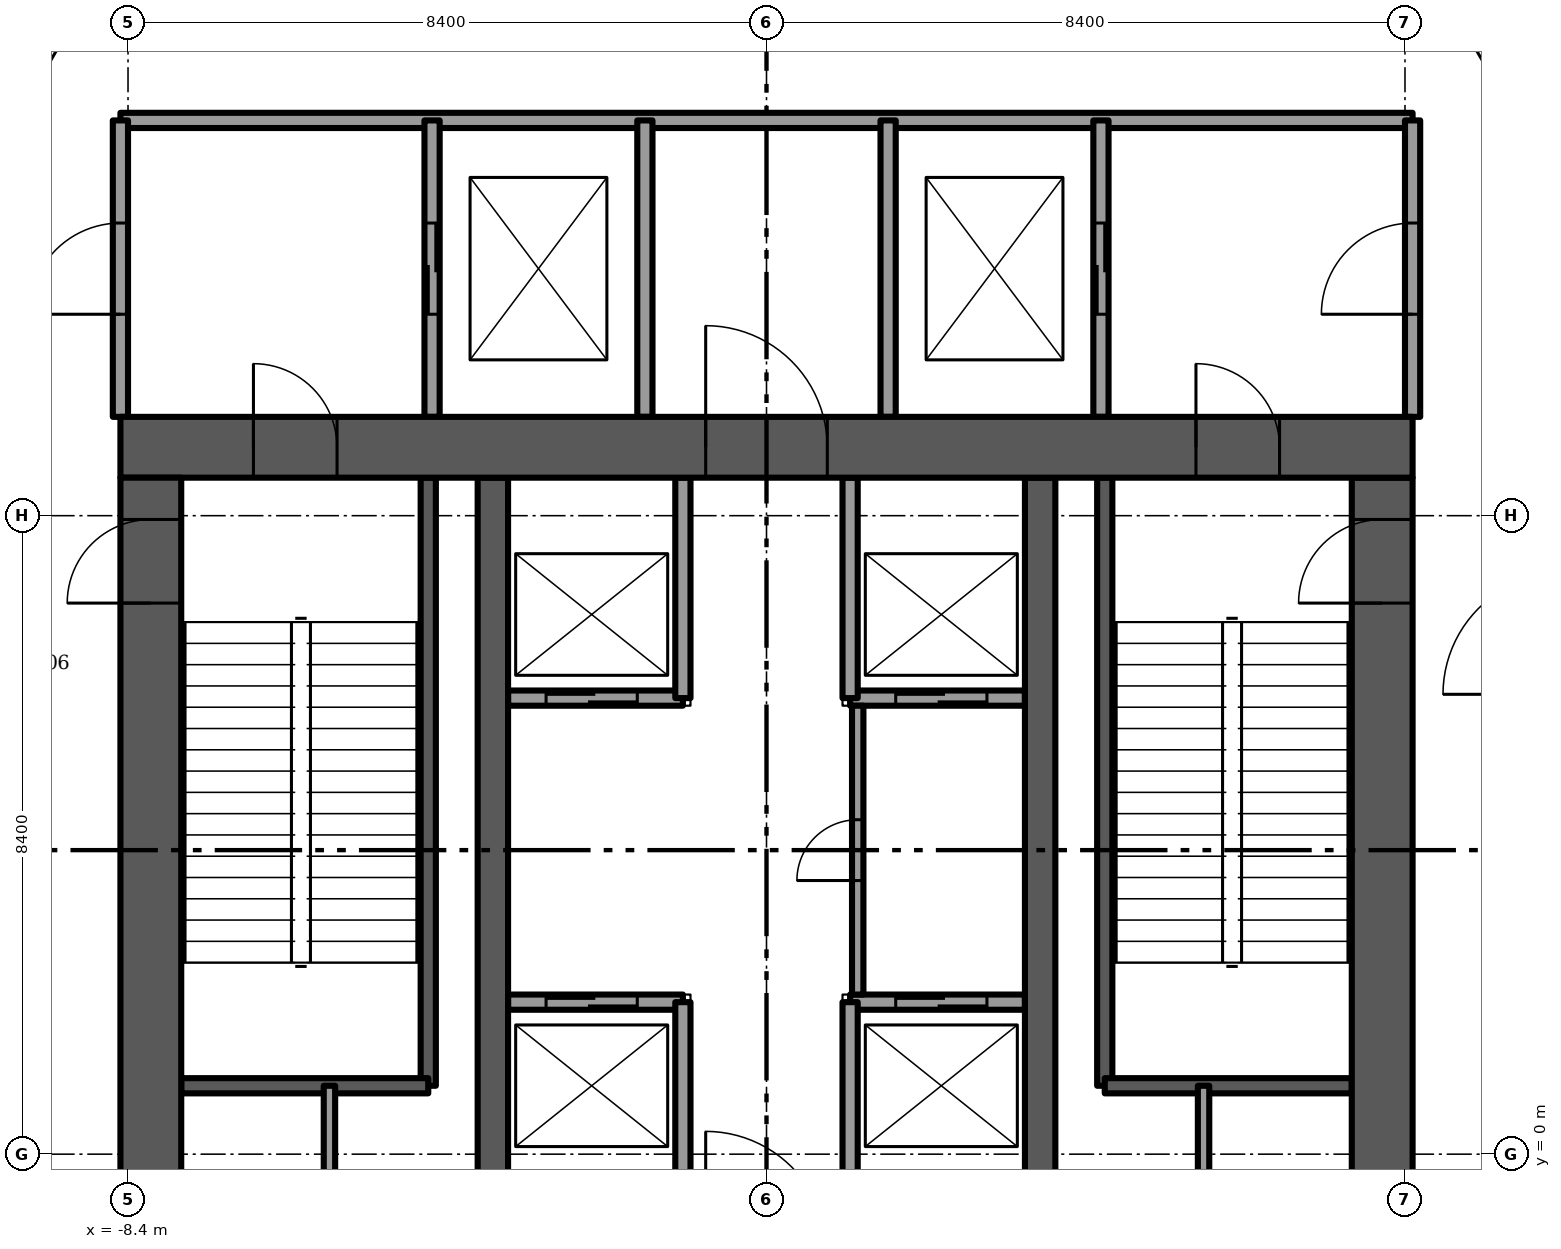
"""IFC4 building model, lengths in metres.
Left out: names, types, materials, properties, quantities, classifications, styles, units other than length and angle.
Written with IfcOpenShell. Run it as: python <this file> out.ifc"""

import sys

from ifc_helpers import new_model, si_unit, direction, frame, frame_2d, origin, place, context, subcontext, project, spatial, rectangle, extrude, element, fill, save


model = new_model("IFC4")
c1 = context("Model", 3, precision=1e-05, world=origin(), true_north=direction((0.0, 1.0)))
c2 = subcontext(c1, "Body", "Model", "MODEL_VIEW")
j1 = project(units=[si_unit("LENGTHUNIT", "METRE"), si_unit("PLANEANGLEUNIT", "RADIAN")], contexts=[c1])
p1 = place(None, origin())
s1 = spatial("IfcSite", under=j1, at=p1, CompositionType="ELEMENT")
p2 = place(p1, origin())
s2 = spatial("IfcBuilding", under=s1, at=p2, CompositionType="ELEMENT")
p3 = place(p2, frame((0.0, 0.0, 151.0)))
s3 = spatial("IfcBuildingStorey", under=s2, at=p3, CompositionType="ELEMENT", Elevation=151.0)
p4 = place(p3, frame((-8.5, 9.3, -0.3), z_axis=(0.0, 0.0, 1.0), x_axis=(1.0, 0.0, 0.0)))
e1 = element("IfcWall", 1, at=p4, inside=s3, PredefinedType="SHEAR", context=c2, shape_type="SweptSolid", body=[
    extrude(rectangle(XDim=17.0, YDim=0.8, at=frame_2d((8.5, 0.0))), origin(), (0.0, 0.0, 1.0), 6.0),
])
p5 = place(p4, frame((7.7, 0.0, 0.0)))
e2 = element("IfcOpeningElement", 2, at=p5, cuts=e1, PredefinedType="OPENING", context=c2, shape_type="SweptSolid", body=[
    extrude(rectangle(XDim=1.6, YDim=2.1, at=frame_2d((0.8, 1.05))), frame((0.0, 0.4, 0.0), z_axis=(0.0, -1.0, 0.0), x_axis=(1.0, 0.0, 0.0)), (0.0, 0.0, 1.0), 0.8),
])
p6 = place(p4, frame((1.75, 0.0, 0.0)))
e3 = element("IfcOpeningElement", 3, at=p6, cuts=e1, PredefinedType="OPENING", context=c2, shape_type="SweptSolid", body=[
    extrude(rectangle(XDim=1.1, YDim=2.1, at=frame_2d((0.55, 1.05))), frame((0.0, 0.4, 0.0), z_axis=(0.0, -1.0, 0.0), x_axis=(1.0, 0.0, 0.0)), (0.0, 0.0, 1.0), 0.8),
])
p7 = place(p4, frame((14.15, 0.0, 0.0)))
e4 = element("IfcOpeningElement", 4, at=p7, cuts=e1, PredefinedType="OPENING", context=c2, shape_type="SweptSolid", body=[
    extrude(rectangle(XDim=1.1, YDim=2.1, at=frame_2d((0.55, 1.05))), frame((0.0, 0.4, 0.0), z_axis=(0.0, -1.0, 0.0), x_axis=(1.0, 0.0, 0.0)), (0.0, 0.0, 1.0), 0.8),
])
p8 = place(p3, frame((-8.1, -0.9, -0.3), z_axis=(0.0, 0.0, 1.0), x_axis=(0.0, 1.0, 0.0)))
e5 = element("IfcWall", 5, at=p8, inside=s3, PredefinedType="SHEAR", context=c2, shape_type="SweptSolid", body=[
    extrude(rectangle(XDim=9.8, YDim=0.8, at=frame_2d((4.9, 0.0))), origin(), (0.0, 0.0, 1.0), 6.0),
])
p9 = place(p8, frame((8.15, 0.0, 0.0)))
e6 = element("IfcOpeningElement", 6, at=p9, cuts=e5, PredefinedType="OPENING", context=c2, shape_type="SweptSolid", body=[
    extrude(rectangle(XDim=1.1, YDim=2.1, at=frame_2d((0.55, 1.05))), frame((0.0, 0.4, 0.0), z_axis=(0.0, -1.0, 0.0), x_axis=(1.0, 0.0, 0.0)), (0.0, 0.0, 1.0), 0.8),
])
p10 = place(p3, frame((8.1, -0.9, -0.3), z_axis=(0.0, 0.0, 1.0), x_axis=(0.0, 1.0, 0.0)))
e7 = element("IfcWall", 7, at=p10, inside=s3, PredefinedType="SHEAR", context=c2, shape_type="SweptSolid", body=[
    extrude(rectangle(XDim=9.8, YDim=0.8, at=frame_2d((4.9, 0.0))), origin(), (0.0, 0.0, 1.0), 6.0),
])
p11 = place(p10, frame((8.15, 0.0, 0.0)))
e8 = element("IfcOpeningElement", 8, at=p11, cuts=e7, PredefinedType="OPENING", context=c2, shape_type="SweptSolid", body=[
    extrude(rectangle(XDim=1.1, YDim=2.1, at=frame_2d((0.55, 1.05))), frame((0.0, 0.4, 0.0), z_axis=(0.0, -1.0, 0.0), x_axis=(1.0, 0.0, 0.0)), (0.0, 0.0, 1.0), 0.8),
])
for number, where, z_axis, x_axis in (
    (9, (-3.6, -0.9, -0.3), (0.0, 0.0, 1.0), (0.0, 1.0, 0.0)),
    (10, (3.6, -0.9, -0.3), (0.0, 0.0, 1.0), (0.0, 1.0, 0.0)),
):
    element("IfcWall", number, at=place(p3, frame(where, z_axis=z_axis, x_axis=x_axis)), inside=s3, PredefinedType="SHEAR", context=c2, shape_type="SweptSolid", body=[
        extrude(rectangle(XDim=9.8, YDim=0.4, at=frame_2d((4.9, 0.0))), origin(), (0.0, 0.0, 1.0), 6.0),
    ])
p12 = place(p3, frame((-3.4, 2.0, 0.0), z_axis=(0.0, 0.0, 1.0), x_axis=(1.0, 0.0, 0.0)))
e11 = element("IfcWall", 11, at=p12, inside=s3, PredefinedType="PARTITIONING", context=c2, shape_type="SweptSolid", body=[
    extrude(rectangle(XDim=2.3, YDim=0.2, at=frame_2d((1.15, 0.0))), origin(), (0.0, 0.0, 1.0), 5.7),
])
p13 = place(p12, frame((0.5, 0.0, 0.0)))
e12 = element("IfcOpeningElement", 12, at=p13, cuts=e11, PredefinedType="OPENING", context=c2, shape_type="SweptSolid", body=[
    extrude(rectangle(XDim=1.2, YDim=2.1, at=frame_2d((0.6, 1.05))), frame((0.0, 0.1, 0.0), z_axis=(0.0, -1.0, 0.0), x_axis=(1.0, 0.0, 0.0)), (0.0, 0.0, 1.0), 0.2),
])
p14 = place(p3, frame((-3.4, 6.0, 0.0), z_axis=(0.0, 0.0, 1.0), x_axis=(1.0, 0.0, 0.0)))
e13 = element("IfcWall", 13, at=p14, inside=s3, PredefinedType="PARTITIONING", context=c2, shape_type="SweptSolid", body=[
    extrude(rectangle(XDim=2.3, YDim=0.2, at=frame_2d((1.15, 0.0))), origin(), (0.0, 0.0, 1.0), 5.7),
])
p15 = place(p14, frame((0.5, 0.0, 0.0)))
e14 = element("IfcOpeningElement", 14, at=p15, cuts=e13, PredefinedType="OPENING", context=c2, shape_type="SweptSolid", body=[
    extrude(rectangle(XDim=1.2, YDim=2.1, at=frame_2d((0.6, 1.05))), frame((0.0, 0.1, 0.0), z_axis=(0.0, -1.0, 0.0), x_axis=(1.0, 0.0, 0.0)), (0.0, 0.0, 1.0), 0.2),
])
p16 = place(p3, frame((1.1, 2.0, 0.0), z_axis=(0.0, 0.0, 1.0), x_axis=(1.0, 0.0, 0.0)))
e15 = element("IfcWall", 15, at=p16, inside=s3, PredefinedType="PARTITIONING", context=c2, shape_type="SweptSolid", body=[
    extrude(rectangle(XDim=2.3, YDim=0.2, at=frame_2d((1.15, 0.0))), origin(), (0.0, 0.0, 1.0), 5.7),
])
p17 = place(p16, frame((0.6, 0.0, 0.0)))
e16 = element("IfcOpeningElement", 16, at=p17, cuts=e15, PredefinedType="OPENING", context=c2, shape_type="SweptSolid", body=[
    extrude(rectangle(XDim=1.2, YDim=2.1, at=frame_2d((0.6, 1.05))), frame((0.0, 0.1, 0.0), z_axis=(0.0, -1.0, 0.0), x_axis=(1.0, 0.0, 0.0)), (0.0, 0.0, 1.0), 0.2),
])
p18 = place(p3, frame((1.1, 6.0, 0.0), z_axis=(0.0, 0.0, 1.0), x_axis=(1.0, 0.0, 0.0)))
e17 = element("IfcWall", 17, at=p18, inside=s3, PredefinedType="PARTITIONING", context=c2, shape_type="SweptSolid", body=[
    extrude(rectangle(XDim=2.3, YDim=0.2, at=frame_2d((1.15, 0.0))), origin(), (0.0, 0.0, 1.0), 5.7),
])
p19 = place(p18, frame((0.6, 0.0, 0.0)))
e18 = element("IfcOpeningElement", 18, at=p19, cuts=e17, PredefinedType="OPENING", context=c2, shape_type="SweptSolid", body=[
    extrude(rectangle(XDim=1.2, YDim=2.1, at=frame_2d((0.6, 1.05))), frame((0.0, 0.1, 0.0), z_axis=(0.0, -1.0, 0.0), x_axis=(1.0, 0.0, 0.0)), (0.0, 0.0, 1.0), 0.2),
])
for number, where, z_axis, x_axis in (
    (19, (-1.1, -0.9, 0.0), (0.0, 0.0, 1.0), (0.0, 1.0, 0.0)),
    (20, (1.1, -0.9, 0.0), (0.0, 0.0, 1.0), (0.0, 1.0, 0.0)),
    (21, (-1.1, 6.0, 0.0), (0.0, 0.0, 1.0), (0.0, 1.0, 0.0)),
    (22, (1.1, 6.0, 0.0), (0.0, 0.0, 1.0), (0.0, 1.0, 0.0)),
):
    element("IfcWall", number, at=place(p3, frame(where, z_axis=z_axis, x_axis=x_axis)), inside=s3, PredefinedType="PARTITIONING", context=c2, shape_type="SweptSolid", body=[
        extrude(rectangle(XDim=2.9, YDim=0.2, at=frame_2d((1.45, 0.0))), origin(), (0.0, 0.0, 1.0), 5.7),
    ])
p20 = place(p3, frame((-4.45, 0.9, -0.3), z_axis=(0.0, 0.0, 1.0), x_axis=(0.0, 1.0, 0.0)))
e23 = element("IfcWall", 23, at=p20, inside=s3, PredefinedType="SOLIDWALL", context=c2, shape_type="SweptSolid", body=[
    extrude(rectangle(XDim=8.0, YDim=0.2, at=frame_2d((4.0, 0.0))), origin(), (0.0, 0.0, 1.0), 6.0),
])
p21 = place(p3, frame((-7.7, 0.9, -0.3), z_axis=(0.0, 0.0, 1.0), x_axis=(1.0, 0.0, 0.0)))
e24 = element("IfcWall", 24, at=p21, inside=s3, PredefinedType="SOLIDWALL", context=c2, shape_type="SweptSolid", body=[
    extrude(rectangle(XDim=3.25, YDim=0.2, at=frame_2d((1.625, 0.0))), origin(), (0.0, 0.0, 1.0), 6.0),
])
p22 = place(p3, frame((-5.75, -0.9, 0.0), z_axis=(0.0, 0.0, 1.0), x_axis=(0.0, 1.0, 0.0)))
e25 = element("IfcWall", 25, at=p22, inside=s3, PredefinedType="PARTITIONING", context=c2, shape_type="SweptSolid", body=[
    extrude(rectangle(XDim=1.8, YDim=0.15, at=frame_2d((0.9, 0.0))), origin(), (0.0, 0.0, 1.0), 5.7),
])
p23 = place(p3, frame((4.45, 0.9, -0.3), z_axis=(0.0, 0.0, 1.0), x_axis=(0.0, 1.0, 0.0)))
e26 = element("IfcWall", 26, at=p23, inside=s3, PredefinedType="SOLIDWALL", context=c2, shape_type="SweptSolid", body=[
    extrude(rectangle(XDim=8.0, YDim=0.2, at=frame_2d((4.0, 0.0))), origin(), (0.0, 0.0, 1.0), 6.0),
])
p24 = place(p3, frame((4.45, 0.9, -0.3), z_axis=(0.0, 0.0, 1.0), x_axis=(1.0, 0.0, 0.0)))
e27 = element("IfcWall", 27, at=p24, inside=s3, PredefinedType="SOLIDWALL", context=c2, shape_type="SweptSolid", body=[
    extrude(rectangle(XDim=3.25, YDim=0.2, at=frame_2d((1.625, 0.0))), origin(), (0.0, 0.0, 1.0), 6.0),
])
p25 = place(p3, frame((5.75, -0.9, 0.0), z_axis=(0.0, 0.0, 1.0), x_axis=(0.0, 1.0, 0.0)))
e28 = element("IfcWall", 28, at=p25, inside=s3, PredefinedType="PARTITIONING", context=c2, shape_type="SweptSolid", body=[
    extrude(rectangle(XDim=1.8, YDim=0.15, at=frame_2d((0.9, 0.0))), origin(), (0.0, 0.0, 1.0), 5.7),
])
p26 = place(p3, frame((-8.5, 13.6, 0.0), z_axis=(0.0, 0.0, 1.0), x_axis=(1.0, 0.0, 0.0)))
e29 = element("IfcWall", 29, at=p26, inside=s3, PredefinedType="PARTITIONING", context=c2, shape_type="SweptSolid", body=[
    extrude(rectangle(XDim=17.0, YDim=0.2, at=frame_2d((8.5, 0.0))), origin(), (0.0, 0.0, 1.0), 5.7),
])
p27 = place(p3, frame((-8.5, 9.7, 0.0), z_axis=(0.0, 0.0, 1.0), x_axis=(0.0, 1.0, 0.0)))
e30 = element("IfcWall", 30, at=p27, inside=s3, PredefinedType="PARTITIONING", context=c2, shape_type="SweptSolid", body=[
    extrude(rectangle(XDim=3.9, YDim=0.2, at=frame_2d((1.95, 0.0))), origin(), (0.0, 0.0, 1.0), 5.7),
])
p28 = place(p27, frame((1.35, 0.0, 0.0)))
e31 = element("IfcOpeningElement", 31, at=p28, cuts=e30, PredefinedType="OPENING", context=c2, shape_type="SweptSolid", body=[
    extrude(rectangle(XDim=1.2, YDim=2.1, at=frame_2d((0.6, 1.05))), frame((0.0, 0.1, 0.0), z_axis=(0.0, -1.0, 0.0), x_axis=(1.0, 0.0, 0.0)), (0.0, 0.0, 1.0), 0.2),
])
p29 = place(p3, frame((8.5, 9.7, 0.0), z_axis=(0.0, 0.0, 1.0), x_axis=(0.0, 1.0, 0.0)))
e32 = element("IfcWall", 32, at=p29, inside=s3, PredefinedType="PARTITIONING", context=c2, shape_type="SweptSolid", body=[
    extrude(rectangle(XDim=3.9, YDim=0.2, at=frame_2d((1.95, 0.0))), origin(), (0.0, 0.0, 1.0), 5.7),
])
p30 = place(p29, frame((1.35, 0.0, 0.0)))
e33 = element("IfcOpeningElement", 33, at=p30, cuts=e32, PredefinedType="OPENING", context=c2, shape_type="SweptSolid", body=[
    extrude(rectangle(XDim=1.2, YDim=2.1, at=frame_2d((0.6, 1.05))), frame((0.0, 0.1, 0.0), z_axis=(0.0, -1.0, 0.0), x_axis=(1.0, 0.0, 0.0)), (0.0, 0.0, 1.0), 0.2),
])
p31 = place(p3, frame((-4.4, 9.7, 0.0), z_axis=(0.0, 0.0, 1.0), x_axis=(0.0, 1.0, 0.0)))
e34 = element("IfcWall", 34, at=p31, inside=s3, PredefinedType="PARTITIONING", context=c2, shape_type="SweptSolid", body=[
    extrude(rectangle(XDim=3.9, YDim=0.2, at=frame_2d((1.95, 0.0))), origin(), (0.0, 0.0, 1.0), 5.7),
])
p32 = place(p31, frame((1.35, 0.0, 0.0)))
e35 = element("IfcOpeningElement", 35, at=p32, cuts=e34, PredefinedType="OPENING", context=c2, shape_type="SweptSolid", body=[
    extrude(rectangle(XDim=1.2, YDim=2.1, at=frame_2d((0.6, 1.05))), frame((0.0, 0.1, 0.0), z_axis=(0.0, -1.0, 0.0), x_axis=(1.0, 0.0, 0.0)), (0.0, 0.0, 1.0), 0.2),
])
p33 = place(p3, frame((4.4, 9.7, 0.0), z_axis=(0.0, 0.0, 1.0), x_axis=(0.0, 1.0, 0.0)))
e36 = element("IfcWall", 36, at=p33, inside=s3, PredefinedType="PARTITIONING", context=c2, shape_type="SweptSolid", body=[
    extrude(rectangle(XDim=3.9, YDim=0.2, at=frame_2d((1.95, 0.0))), origin(), (0.0, 0.0, 1.0), 5.7),
])
p34 = place(p33, frame((1.35, 0.0, 0.0)))
e37 = element("IfcOpeningElement", 37, at=p34, cuts=e36, PredefinedType="OPENING", context=c2, shape_type="SweptSolid", body=[
    extrude(rectangle(XDim=1.2, YDim=2.1, at=frame_2d((0.6, 1.05))), frame((0.0, 0.1, 0.0), z_axis=(0.0, -1.0, 0.0), x_axis=(1.0, 0.0, 0.0)), (0.0, 0.0, 1.0), 0.2),
])
for number, where, z_axis, x_axis in (
    (38, (-1.6, 9.7, 0.0), (0.0, 0.0, 1.0), (0.0, 1.0, 0.0)),
    (39, (1.6, 9.7, 0.0), (0.0, 0.0, 1.0), (0.0, 1.0, 0.0)),
):
    element("IfcWall", number, at=place(p3, frame(where, z_axis=z_axis, x_axis=x_axis)), inside=s3, PredefinedType="PARTITIONING", context=c2, shape_type="SweptSolid", body=[
        extrude(rectangle(XDim=3.9, YDim=0.2, at=frame_2d((1.95, 0.0))), origin(), (0.0, 0.0, 1.0), 5.7),
    ])
p35 = place(p3, frame((1.2, 2.1, 0.0), z_axis=(0.0, 0.0, 1.0), x_axis=(0.0, 1.0, 0.0)))
e40 = element("IfcWall", 40, at=p35, inside=s3, PredefinedType="PARTITIONING", context=c2, shape_type="SweptSolid", body=[
    extrude(rectangle(XDim=3.8, YDim=0.15, at=frame_2d((1.9, 0.0))), origin(), (0.0, 0.0, 1.0), 5.7),
])
p36 = place(p35, frame((1.5, 0.0, 0.0)))
e41 = element("IfcOpeningElement", 41, at=p36, cuts=e40, PredefinedType="OPENING", context=c2, shape_type="SweptSolid", body=[
    extrude(rectangle(XDim=0.8, YDim=2.1, at=frame_2d((0.4, 1.05))), frame((0.0, 0.075, 0.0), z_axis=(0.0, -1.0, 0.0), x_axis=(1.0, 0.0, 0.0)), (0.0, 0.0, 1.0), 0.15),
])
p37 = place(p13, origin())
e42 = element("IfcDoor", 42, at=p37, inside=s3, OperationType="SLIDING_TO_LEFT", PredefinedType="DOOR", context=c2, shape_type="SweptSolid", body=[
    extrude(rectangle(XDim=1.2, YDim=2.1, at=frame_2d((0.6, 1.05))), frame((0.0, 0.025, 0.0), z_axis=(0.0, -1.0, 0.0), x_axis=(1.0, 0.0, 0.0)), (0.0, 0.0, 1.0), 0.05),
])
fill(e12, e42)
p38 = place(p17, origin())
e43 = element("IfcDoor", 43, at=p38, inside=s3, OperationType="SLIDING_TO_LEFT", PredefinedType="DOOR", context=c2, shape_type="SweptSolid", body=[
    extrude(rectangle(XDim=1.2, YDim=2.1, at=frame_2d((0.6, 1.05))), frame((0.0, 0.025, 0.0), z_axis=(0.0, -1.0, 0.0), x_axis=(1.0, 0.0, 0.0)), (0.0, 0.0, 1.0), 0.05),
])
fill(e16, e43)
p39 = place(p15, origin())
e44 = element("IfcDoor", 44, at=p39, inside=s3, OperationType="SLIDING_TO_LEFT", PredefinedType="DOOR", context=c2, shape_type="SweptSolid", body=[
    extrude(rectangle(XDim=1.2, YDim=2.1, at=frame_2d((0.6, 1.05))), frame((0.0, 0.025, 0.0), z_axis=(0.0, -1.0, 0.0), x_axis=(1.0, 0.0, 0.0)), (0.0, 0.0, 1.0), 0.05),
])
fill(e14, e44)
p40 = place(p19, origin())
e45 = element("IfcDoor", 45, at=p40, inside=s3, OperationType="SLIDING_TO_LEFT", PredefinedType="DOOR", context=c2, shape_type="SweptSolid", body=[
    extrude(rectangle(XDim=1.2, YDim=2.1, at=frame_2d((0.6, 1.05))), frame((0.0, 0.025, 0.0), z_axis=(0.0, -1.0, 0.0), x_axis=(1.0, 0.0, 0.0)), (0.0, 0.0, 1.0), 0.05),
])
fill(e18, e45)
p41 = place(p5, origin())
e46 = element("IfcDoor", 46, at=p41, inside=s3, OperationType="DOUBLE_DOOR_SINGLE_SWING", PredefinedType="DOOR", context=c2, shape_type="SweptSolid", body=[
    extrude(rectangle(XDim=1.6, YDim=2.1, at=frame_2d((0.8, 1.05))), frame((0.0, 0.025, 0.0), z_axis=(0.0, -1.0, 0.0), x_axis=(1.0, 0.0, 0.0)), (0.0, 0.0, 1.0), 0.05),
])
fill(e2, e46)
p42 = place(p6, origin())
e47 = element("IfcDoor", 47, at=p42, inside=s3, OperationType="SINGLE_SWING_LEFT", PredefinedType="DOOR", context=c2, shape_type="SweptSolid", body=[
    extrude(rectangle(XDim=1.1, YDim=2.1, at=frame_2d((0.55, 1.05))), frame((0.0, 0.025, 0.0), z_axis=(0.0, -1.0, 0.0), x_axis=(1.0, 0.0, 0.0)), (0.0, 0.0, 1.0), 0.05),
])
fill(e3, e47)
p43 = place(p9, origin())
e48 = element("IfcDoor", 48, at=p43, inside=s3, OperationType="SINGLE_SWING_RIGHT", PredefinedType="DOOR", context=c2, shape_type="SweptSolid", body=[
    extrude(rectangle(XDim=1.1, YDim=2.1, at=frame_2d((0.55, 1.05))), frame((0.0, 0.025, 0.0), z_axis=(0.0, -1.0, 0.0), x_axis=(1.0, 0.0, 0.0)), (0.0, 0.0, 1.0), 0.05),
])
fill(e6, e48)
p44 = place(p7, origin())
e49 = element("IfcDoor", 49, at=p44, inside=s3, OperationType="SINGLE_SWING_RIGHT", PredefinedType="DOOR", context=c2, shape_type="SweptSolid", body=[
    extrude(rectangle(XDim=1.1, YDim=2.1, at=frame_2d((0.55, 1.05))), frame((0.0, 0.025, 0.0), z_axis=(0.0, -1.0, 0.0), x_axis=(1.0, 0.0, 0.0)), (0.0, 0.0, 1.0), 0.05),
])
fill(e4, e49)
p45 = place(p11, origin())
e50 = element("IfcDoor", 50, at=p45, inside=s3, OperationType="SINGLE_SWING_LEFT", PredefinedType="DOOR", context=c2, shape_type="SweptSolid", body=[
    extrude(rectangle(XDim=1.1, YDim=2.1, at=frame_2d((0.55, 1.05))), frame((0.0, 0.025, 0.0), z_axis=(0.0, -1.0, 0.0), x_axis=(1.0, 0.0, 0.0)), (0.0, 0.0, 1.0), 0.05),
])
fill(e8, e50)
p46 = place(p32, origin())
e51 = element("IfcDoor", 51, at=p46, inside=s3, OperationType="SLIDING_TO_LEFT", PredefinedType="DOOR", context=c2, shape_type="SweptSolid", body=[
    extrude(rectangle(XDim=1.2, YDim=2.1, at=frame_2d((0.6, 1.05))), frame((0.0, 0.025, 0.0), z_axis=(0.0, -1.0, 0.0), x_axis=(1.0, 0.0, 0.0)), (0.0, 0.0, 1.0), 0.05),
])
fill(e35, e51)
p47 = place(p28, origin())
e52 = element("IfcDoor", 52, at=p47, inside=s3, OperationType="SINGLE_SWING_LEFT", PredefinedType="DOOR", context=c2, shape_type="SweptSolid", body=[
    extrude(rectangle(XDim=1.2, YDim=2.1, at=frame_2d((0.6, 1.05))), frame((0.0, 0.025, 0.0), z_axis=(0.0, -1.0, 0.0), x_axis=(1.0, 0.0, 0.0)), (0.0, 0.0, 1.0), 0.05),
])
fill(e31, e52)
p48 = place(p34, origin())
e53 = element("IfcDoor", 53, at=p48, inside=s3, OperationType="SLIDING_TO_LEFT", PredefinedType="DOOR", context=c2, shape_type="SweptSolid", body=[
    extrude(rectangle(XDim=1.2, YDim=2.1, at=frame_2d((0.6, 1.05))), frame((0.0, 0.025, 0.0), z_axis=(0.0, -1.0, 0.0), x_axis=(1.0, 0.0, 0.0)), (0.0, 0.0, 1.0), 0.05),
])
fill(e37, e53)
p49 = place(p30, origin())
e54 = element("IfcDoor", 54, at=p49, inside=s3, OperationType="SINGLE_SWING_LEFT", PredefinedType="DOOR", context=c2, shape_type="SweptSolid", body=[
    extrude(rectangle(XDim=1.2, YDim=2.1, at=frame_2d((0.6, 1.05))), frame((0.0, 0.025, 0.0), z_axis=(0.0, -1.0, 0.0), x_axis=(1.0, 0.0, 0.0)), (0.0, 0.0, 1.0), 0.05),
])
fill(e33, e54)
p50 = place(p36, origin())
e55 = element("IfcDoor", 55, at=p50, inside=s3, OperationType="SINGLE_SWING_RIGHT", PredefinedType="DOOR", context=c2, shape_type="SweptSolid", body=[
    extrude(rectangle(XDim=0.8, YDim=2.1, at=frame_2d((0.4, 1.05))), frame((0.0, 0.025, 0.0), z_axis=(0.0, -1.0, 0.0), x_axis=(1.0, 0.0, 0.0)), (0.0, 0.0, 1.0), 0.05),
])
fill(e41, e55)
save(model, sys.argv[1])
